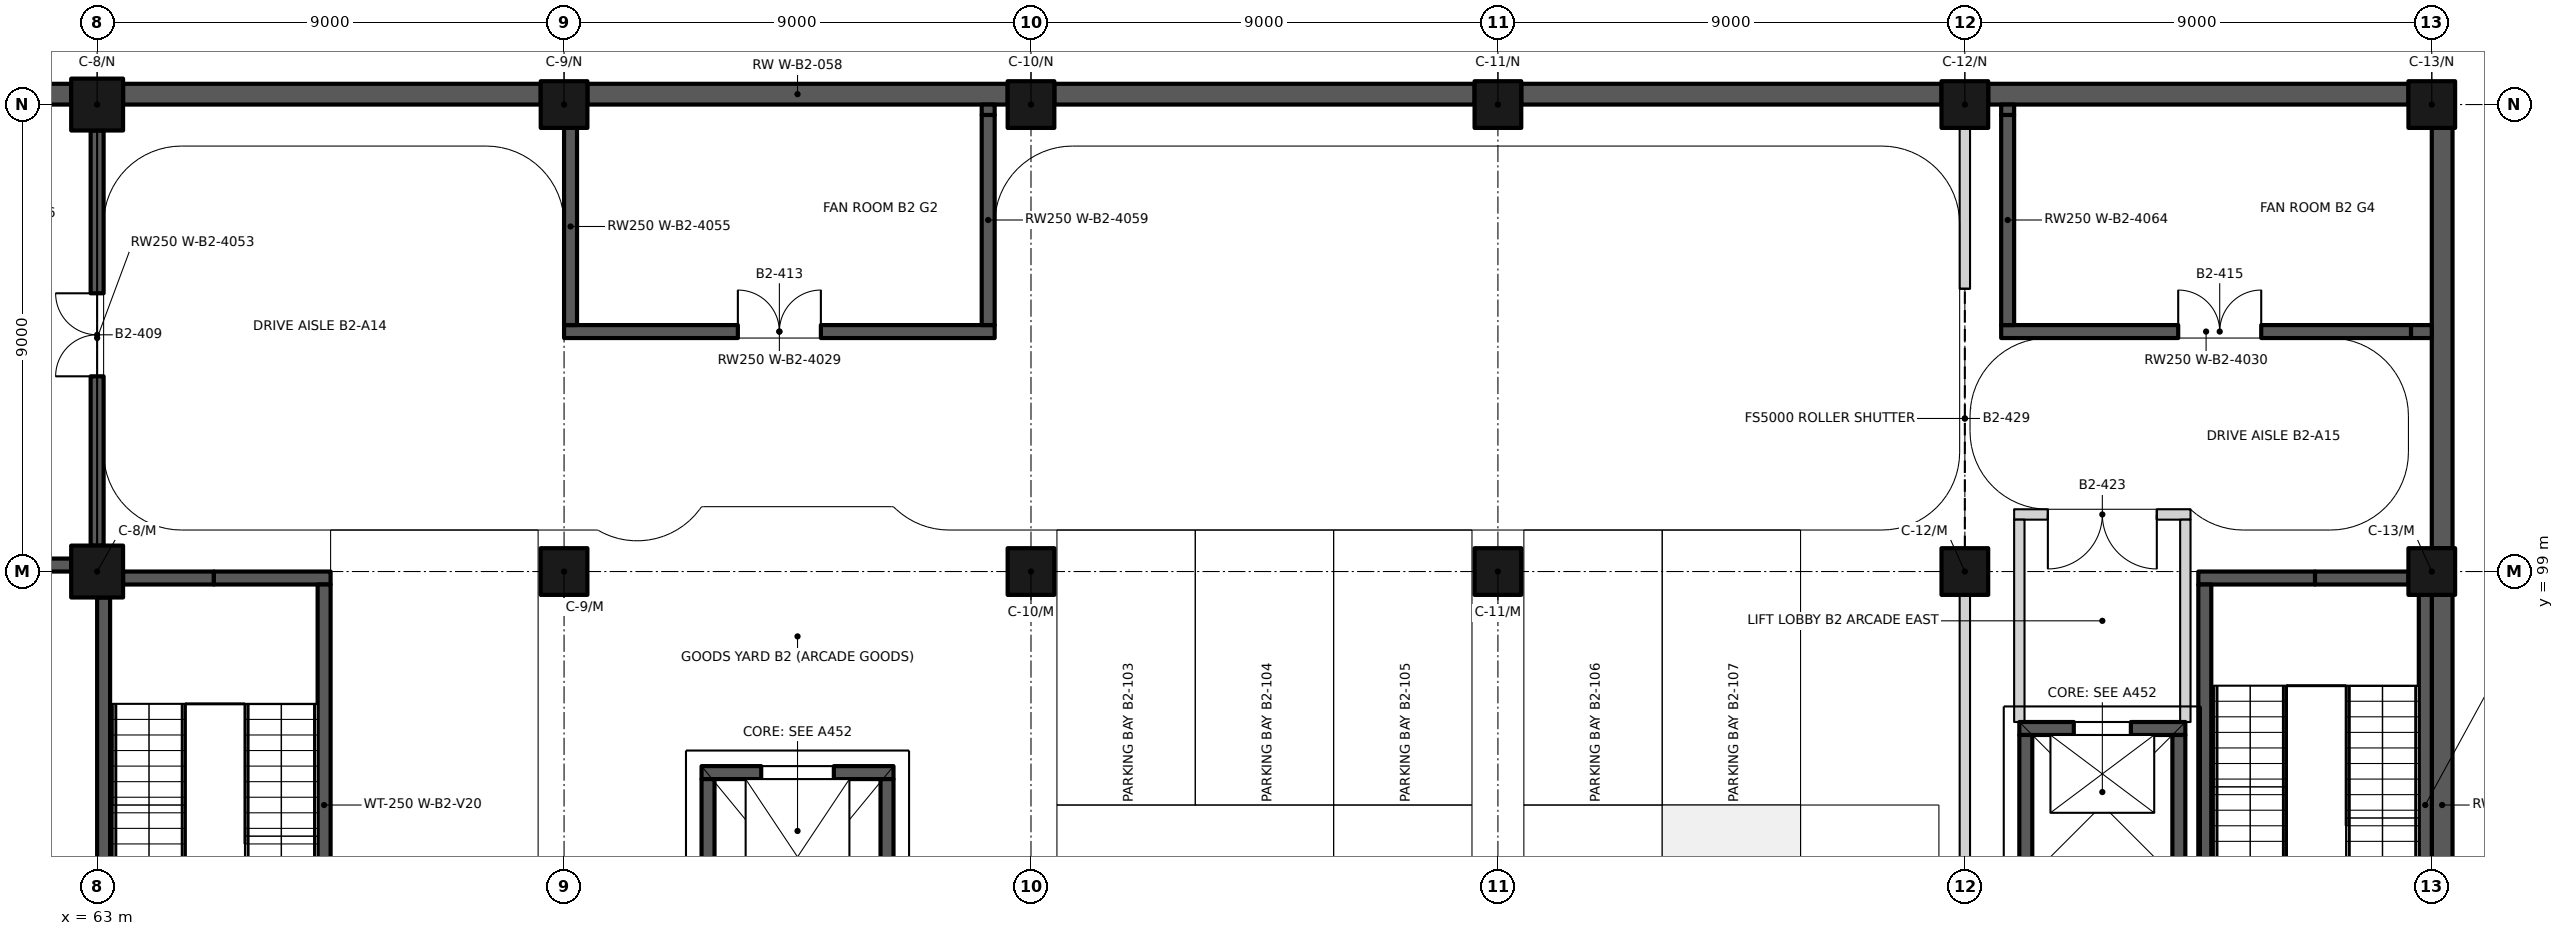
"""IFC4 building model, lengths in metres.
Left out: names, types, materials, properties, quantities, classifications, styles, units other than length and angle.
Written with IfcOpenShell. Run it as: python <this file> out.ifc"""

import sys

from ifc_helpers import new_model, si_unit, direction, frame, frame_2d, origin, origin_2d, place, context, subcontext, project, spatial, rectangle, extrude, element, fill, save


model = new_model("IFC4")
c1 = context("Model", 3, precision=1e-05, world=origin(), true_north=direction((0.0, 1.0)))
c2 = subcontext(c1, "Body", "Model", "MODEL_VIEW")
j1 = project(units=[si_unit("LENGTHUNIT", "METRE"), si_unit("PLANEANGLEUNIT", "RADIAN")], contexts=[c1])
p1 = place(None, origin())
s1 = spatial("IfcSite", under=j1, at=p1, CompositionType="ELEMENT")
p2 = place(p1, origin())
s2 = spatial("IfcBuilding", under=s1, at=p2, CompositionType="ELEMENT")
p3 = place(p2, frame((0.0, 0.0, -9.9)))
s3 = spatial("IfcBuildingStorey", under=s2, at=p3, CompositionType="ELEMENT", Elevation=-9.9)
for number, where, z_axis, x_axis in (
    (1, (108.2, 90.45, -0.5), (0.0, 0.0, 1.0), (0.0, 1.0, 0.0)),
    (2, (108.2, 99.45, -0.5), (0.0, 0.0, 1.0), (0.0, 1.0, 0.0)),
):
    element("IfcWall", number, at=place(p3, frame(where, z_axis=z_axis, x_axis=x_axis)), inside=s3, PredefinedType="SOLIDWALL", context=c2, shape_type="SweptSolid", body=[
        extrude(rectangle(XDim=8.1, YDim=0.4, at=frame_2d((4.05, 0.0))), origin(), (0.0, 0.0, 1.0), 5.3),
    ])
p4 = place(p3, frame((54.5, 108.2, -0.5), z_axis=(0.0, 0.0, 1.0), x_axis=(1.0, 0.0, 0.0)))
e3 = element("IfcWall", 3, at=p4, inside=s3, PredefinedType="SOLIDWALL", context=c2, shape_type="SweptSolid", body=[
    extrude(rectangle(XDim=8.0, YDim=0.4, at=frame_2d((4.0, 0.0))), origin(), (0.0, 0.0, 1.0), 5.3),
])
p5 = place(p3, frame((63.5, 108.2, -0.5), z_axis=(0.0, 0.0, 1.0), x_axis=(1.0, 0.0, 0.0)))
e4 = element("IfcWall", 4, at=p5, inside=s3, PredefinedType="SOLIDWALL", context=c2, shape_type="SweptSolid", body=[
    extrude(rectangle(XDim=8.05, YDim=0.4, at=frame_2d((4.025, 0.0))), origin(), (0.0, 0.0, 1.0), 5.3),
])
for number, where, z_axis, x_axis in (
    (5, (72.45, 108.2, -0.5), (0.0, 0.0, 1.0), (1.0, 0.0, 0.0)),
    (6, (81.45, 108.2, -0.5), (0.0, 0.0, 1.0), (1.0, 0.0, 0.0)),
    (7, (90.45, 108.2, -0.5), (0.0, 0.0, 1.0), (1.0, 0.0, 0.0)),
    (8, (99.45, 108.2, -0.5), (0.0, 0.0, 1.0), (1.0, 0.0, 0.0)),
):
    element("IfcWall", number, at=place(p3, frame(where, z_axis=z_axis, x_axis=x_axis)), inside=s3, PredefinedType="SOLIDWALL", context=c2, shape_type="SweptSolid", body=[
        extrude(rectangle(XDim=8.1, YDim=0.4, at=frame_2d((4.05, 0.0))), origin(), (0.0, 0.0, 1.0), 5.3),
    ])
p6 = place(p3, frame((63.0, 99.0, 0.0), z_axis=(0.0, 0.0, 1.0), x_axis=(1.0, 0.0, 0.0)))
e9 = element("IfcColumn", 9, at=p6, inside=s3, PredefinedType="COLUMN", context=c2, shape_type="SweptSolid", body=[
    extrude(rectangle(XDim=1.0, YDim=1.0, at=origin_2d()), origin(), (0.0, 0.0, 1.0), 4.8),
])
for number, where, z_axis, x_axis in (
    (10, (72.0, 99.0, 0.0), (0.0, 0.0, 1.0), (1.0, 0.0, 0.0)),
    (11, (81.0, 99.0, 0.0), (0.0, 0.0, 1.0), (1.0, 0.0, 0.0)),
    (12, (90.0, 99.0, 0.0), (0.0, 0.0, 1.0), (1.0, 0.0, 0.0)),
    (13, (99.0, 99.0, 0.0), (0.0, 0.0, 1.0), (1.0, 0.0, 0.0)),
    (14, (108.0, 99.0, 0.0), (0.0, 0.0, 1.0), (1.0, 0.0, 0.0)),
):
    element("IfcColumn", number, at=place(p3, frame(where, z_axis=z_axis, x_axis=x_axis)), inside=s3, PredefinedType="COLUMN", context=c2, shape_type="SweptSolid", body=[
        extrude(rectangle(XDim=0.9, YDim=0.9, at=origin_2d()), origin(), (0.0, 0.0, 1.0), 4.8),
    ])
p7 = place(p3, frame((63.0, 108.0, 0.0), z_axis=(0.0, 0.0, 1.0), x_axis=(1.0, 0.0, 0.0)))
e15 = element("IfcColumn", 15, at=p7, inside=s3, PredefinedType="COLUMN", context=c2, shape_type="SweptSolid", body=[
    extrude(rectangle(XDim=1.0, YDim=1.0, at=origin_2d()), origin(), (0.0, 0.0, 1.0), 4.8),
])
for number, where, z_axis, x_axis in (
    (16, (72.0, 108.0, 0.0), (0.0, 0.0, 1.0), (1.0, 0.0, 0.0)),
    (17, (81.0, 108.0, 0.0), (0.0, 0.0, 1.0), (1.0, 0.0, 0.0)),
    (18, (90.0, 108.0, 0.0), (0.0, 0.0, 1.0), (1.0, 0.0, 0.0)),
    (19, (99.0, 108.0, 0.0), (0.0, 0.0, 1.0), (1.0, 0.0, 0.0)),
    (20, (108.0, 108.0, 0.0), (0.0, 0.0, 1.0), (1.0, 0.0, 0.0)),
):
    element("IfcColumn", number, at=place(p3, frame(where, z_axis=z_axis, x_axis=x_axis)), inside=s3, PredefinedType="COLUMN", context=c2, shape_type="SweptSolid", body=[
        extrude(rectangle(XDim=0.9, YDim=0.9, at=origin_2d()), origin(), (0.0, 0.0, 1.0), 4.8),
    ])
p8 = place(p3, frame((103.5, 98.875, 0.0), z_axis=(0.0, 0.0, 1.0), x_axis=(1.0, 0.0, 0.0)))
e21 = element("IfcWall", 21, at=p8, inside=s3, PredefinedType="SHEAR", context=c2, shape_type="SweptSolid", body=[
    extrude(rectangle(XDim=2.25, YDim=0.25, at=frame_2d((1.125, 0.0))), origin(), (0.0, 0.0, 1.0), 4.8),
])
p9 = place(p3, frame((105.75, 98.875, 0.0), z_axis=(0.0, 0.0, 1.0), x_axis=(1.0, 0.0, 0.0)))
e22 = element("IfcWall", 22, at=p9, inside=s3, PredefinedType="SHEAR", context=c2, shape_type="SweptSolid", body=[
    extrude(rectangle(XDim=1.8, YDim=0.25, at=frame_2d((0.9, 0.0))), origin(), (0.0, 0.0, 1.0), 4.8),
])
p10 = place(p3, frame((103.625, 90.25, 0.0), z_axis=(0.0, 0.0, 1.0), x_axis=(0.0, 1.0, 0.0)))
e23 = element("IfcWall", 23, at=p10, inside=s3, PredefinedType="SHEAR", context=c2, shape_type="SweptSolid", body=[
    extrude(rectangle(XDim=8.5, YDim=0.25, at=frame_2d((4.25, 0.0))), origin(), (0.0, 0.0, 1.0), 4.8),
])
p11 = place(p3, frame((107.875, 90.45, 0.0), z_axis=(0.0, 0.0, 1.0), x_axis=(0.0, 1.0, 0.0)))
e24 = element("IfcWall", 24, at=p11, inside=s3, PredefinedType="SHEAR", context=c2, shape_type="SweptSolid", body=[
    extrude(rectangle(XDim=8.1, YDim=0.25, at=frame_2d((4.05, 0.0))), origin(), (0.0, 0.0, 1.0), 4.8),
])
p12 = place(p3, frame((63.5, 98.875, 0.0), z_axis=(0.0, 0.0, 1.0), x_axis=(1.0, 0.0, 0.0)))
e25 = element("IfcWall", 25, at=p12, inside=s3, PredefinedType="SHEAR", context=c2, shape_type="SweptSolid", body=[
    extrude(rectangle(XDim=1.75, YDim=0.25, at=frame_2d((0.875, 0.0))), origin(), (0.0, 0.0, 1.0), 4.8),
])
p13 = place(p3, frame((65.25, 98.875, 0.0), z_axis=(0.0, 0.0, 1.0), x_axis=(1.0, 0.0, 0.0)))
e26 = element("IfcWall", 26, at=p13, inside=s3, PredefinedType="SHEAR", context=c2, shape_type="SweptSolid", body=[
    extrude(rectangle(XDim=2.25, YDim=0.25, at=frame_2d((1.125, 0.0))), origin(), (0.0, 0.0, 1.0), 4.8),
])
p14 = place(p3, frame((63.125, 90.5, 0.0), z_axis=(0.0, 0.0, 1.0), x_axis=(0.0, 1.0, 0.0)))
e27 = element("IfcWall", 27, at=p14, inside=s3, PredefinedType="SHEAR", context=c2, shape_type="SweptSolid", body=[
    extrude(rectangle(XDim=8.0, YDim=0.25, at=frame_2d((4.0, 0.0))), origin(), (0.0, 0.0, 1.0), 4.8),
])
p15 = place(p3, frame((67.375, 90.25, 0.0), z_axis=(0.0, 0.0, 1.0), x_axis=(0.0, 1.0, 0.0)))
e28 = element("IfcWall", 28, at=p15, inside=s3, PredefinedType="SHEAR", context=c2, shape_type="SweptSolid", body=[
    extrude(rectangle(XDim=8.5, YDim=0.25, at=frame_2d((4.25, 0.0))), origin(), (0.0, 0.0, 1.0), 4.8),
])
p16 = place(p3, frame((74.65, 95.125, -1.6), z_axis=(0.0, 0.0, 1.0), x_axis=(1.0, 0.0, 0.0)))
e29 = element("IfcWall", 29, at=p16, inside=s3, PredefinedType="SHEAR", context=c2, shape_type="SweptSolid", body=[
    extrude(rectangle(XDim=3.7, YDim=0.25, at=frame_2d((1.85, 0.0))), origin(), (0.0, 0.0, 1.0), 6.4),
])
p17 = place(p16, frame((1.15, 0.0, 1.6)))
e30 = element("IfcOpeningElement", 30, at=p17, cuts=e29, PredefinedType="OPENING", context=c2, shape_type="SweptSolid", body=[
    extrude(rectangle(XDim=1.4, YDim=2.1, at=frame_2d((0.7, 1.05))), frame((0.0, 0.135, 0.0), z_axis=(0.0, -1.0, 0.0), x_axis=(1.0, 0.0, 0.0)), (0.0, 0.0, 1.0), 0.27),
])
for number, where, z_axis, x_axis in (
    (31, (74.775, 91.0, -1.6), (0.0, 0.0, 1.0), (0.0, 1.0, 0.0)),
    (32, (78.225, 91.0, -1.6), (0.0, 0.0, 1.0), (0.0, 1.0, 0.0)),
):
    element("IfcWall", number, at=place(p3, frame(where, z_axis=z_axis, x_axis=x_axis)), inside=s3, PredefinedType="SHEAR", context=c2, shape_type="SweptSolid", body=[
        extrude(rectangle(XDim=4.0, YDim=0.25, at=frame_2d((2.0, 0.0))), origin(), (0.0, 0.0, 1.0), 6.4),
    ])
p18 = place(p3, frame((100.05, 95.975, -1.6), z_axis=(0.0, 0.0, 1.0), x_axis=(1.0, 0.0, 0.0)))
e33 = element("IfcWall", 33, at=p18, inside=s3, PredefinedType="SHEAR", context=c2, shape_type="SweptSolid", body=[
    extrude(rectangle(XDim=3.2, YDim=0.25, at=frame_2d((1.6, 0.0))), origin(), (0.0, 0.0, 1.0), 6.4),
])
p19 = place(p18, frame((1.05, 0.0, 1.6)))
e34 = element("IfcOpeningElement", 34, at=p19, cuts=e33, PredefinedType="OPENING", context=c2, shape_type="SweptSolid", body=[
    extrude(rectangle(XDim=1.1, YDim=2.1, at=frame_2d((0.55, 1.05))), frame((0.0, 0.135, 0.0), z_axis=(0.0, -1.0, 0.0), x_axis=(1.0, 0.0, 0.0)), (0.0, 0.0, 1.0), 0.27),
])
for number, where, z_axis, x_axis in (
    (35, (100.175, 93.15, -1.6), (0.0, 0.0, 1.0), (0.0, 1.0, 0.0)),
    (36, (103.125, 93.15, -1.6), (0.0, 0.0, 1.0), (0.0, 1.0, 0.0)),
):
    element("IfcWall", number, at=place(p3, frame(where, z_axis=z_axis, x_axis=x_axis)), inside=s3, PredefinedType="SHEAR", context=c2, shape_type="SweptSolid", body=[
        extrude(rectangle(XDim=2.7, YDim=0.25, at=frame_2d((1.35, 0.0))), origin(), (0.0, 0.0, 1.0), 6.4),
    ])
p20 = place(p3, frame((58.5, 99.125, 0.0), z_axis=(0.0, 0.0, 1.0), x_axis=(1.0, 0.0, 0.0)))
e37 = element("IfcWall", 37, at=p20, inside=s3, PredefinedType="SOLIDWALL", context=c2, shape_type="SweptSolid", body=[
    extrude(rectangle(XDim=4.0, YDim=0.25, at=frame_2d((2.0, 0.0))), origin(), (0.0, 0.0, 1.0), 4.0),
])
p21 = place(p3, frame((99.95, 100.1, 0.0), z_axis=(0.0, 0.0, 1.0), x_axis=(1.0, 0.0, 0.0)))
e38 = element("IfcWall", 38, at=p21, inside=s3, PredefinedType="PARTITIONING", context=c2, shape_type="SweptSolid", body=[
    extrude(rectangle(XDim=3.4, YDim=0.2, at=frame_2d((1.7, 0.0))), origin(), (0.0, 0.0, 1.0), 4.5),
])
p22 = place(p21, frame((2.75, 0.0, 0.0), z_axis=(0.0, 0.0, 1.0), x_axis=(-1.0, 0.0, 0.0)))
e39 = element("IfcOpeningElement", 39, at=p22, cuts=e38, PredefinedType="OPENING", context=c2, shape_type="SweptSolid", body=[
    extrude(rectangle(XDim=2.1, YDim=2.4, at=frame_2d((1.05, 1.2))), frame((0.0, 0.11, 0.0), z_axis=(0.0, -1.0, 0.0), x_axis=(1.0, 0.0, 0.0)), (0.0, 0.0, 1.0), 0.22),
])
p23 = place(p3, frame((72.0, 103.625, 0.0), z_axis=(0.0, 0.0, 1.0), x_axis=(1.0, 0.0, 0.0)))
e40 = element("IfcWall", 40, at=p23, inside=s3, PredefinedType="SOLIDWALL", context=c2, shape_type="SweptSolid", body=[
    extrude(rectangle(XDim=8.3, YDim=0.25, at=frame_2d((4.15, 0.0))), origin(), (0.0, 0.0, 1.0), 4.5),
])
p24 = place(p23, frame((3.35, 0.0, 0.0)))
e41 = element("IfcOpeningElement", 41, at=p24, cuts=e40, PredefinedType="OPENING", context=c2, shape_type="SweptSolid", body=[
    extrude(rectangle(XDim=1.6, YDim=2.1, at=frame_2d((0.8, 1.05))), frame((0.0, 0.135, 0.0), z_axis=(0.0, -1.0, 0.0), x_axis=(1.0, 0.0, 0.0)), (0.0, 0.0, 1.0), 0.27),
])
p25 = place(p3, frame((99.7, 103.625, 0.0), z_axis=(0.0, 0.0, 1.0), x_axis=(1.0, 0.0, 0.0)))
e42 = element("IfcWall", 42, at=p25, inside=s3, PredefinedType="SOLIDWALL", context=c2, shape_type="SweptSolid", body=[
    extrude(rectangle(XDim=7.9, YDim=0.25, at=frame_2d((3.95, 0.0))), origin(), (0.0, 0.0, 1.0), 4.5),
])
p26 = place(p25, frame((3.413, 0.0, 0.0)))
e43 = element("IfcOpeningElement", 43, at=p26, cuts=e42, PredefinedType="OPENING", context=c2, shape_type="SweptSolid", body=[
    extrude(rectangle(XDim=1.6, YDim=2.1, at=frame_2d((0.8, 1.05))), frame((0.0, 0.135, 0.0), z_axis=(0.0, -1.0, 0.0), x_axis=(1.0, 0.0, 0.0)), (0.0, 0.0, 1.0), 0.27),
])
p27 = place(p3, frame((107.6, 103.625, 0.0), z_axis=(0.0, 0.0, 1.0), x_axis=(1.0, 0.0, 0.0)))
e44 = element("IfcWall", 44, at=p27, inside=s3, PredefinedType="SOLIDWALL", context=c2, shape_type="SweptSolid", body=[
    extrude(rectangle(XDim=0.4, YDim=0.25, at=frame_2d((0.2, 0.0))), origin(), (0.0, 0.0, 1.0), 4.0),
])
p28 = place(p3, frame((63.0, 99.5, 0.0), z_axis=(0.0, 0.0, 1.0), x_axis=(0.0, 1.0, 0.0)))
e45 = element("IfcWall", 45, at=p28, inside=s3, PredefinedType="SOLIDWALL", context=c2, shape_type="SweptSolid", body=[
    extrude(rectangle(XDim=8.0, YDim=0.25, at=frame_2d((4.0, 0.0))), origin(), (0.0, 0.0, 1.0), 4.0),
])
p29 = place(p28, frame((3.262, 0.0, 0.0)))
e46 = element("IfcOpeningElement", 46, at=p29, cuts=e45, PredefinedType="OPENING", context=c2, shape_type="SweptSolid", body=[
    extrude(rectangle(XDim=1.6, YDim=2.1, at=frame_2d((0.8, 1.05))), frame((0.0, 0.135, 0.0), z_axis=(0.0, -1.0, 0.0), x_axis=(1.0, 0.0, 0.0)), (0.0, 0.0, 1.0), 0.27),
])
p30 = place(p3, frame((72.125, 103.75, 0.0), z_axis=(0.0, 0.0, 1.0), x_axis=(0.0, 1.0, 0.0)))
e47 = element("IfcWall", 47, at=p30, inside=s3, PredefinedType="SOLIDWALL", context=c2, shape_type="SweptSolid", body=[
    extrude(rectangle(XDim=3.8, YDim=0.25, at=frame_2d((1.9, 0.0))), origin(), (0.0, 0.0, 1.0), 4.5),
])
p31 = place(p3, frame((80.175, 103.75, 0.0), z_axis=(0.0, 0.0, 1.0), x_axis=(0.0, 1.0, 0.0)))
e48 = element("IfcWall", 48, at=p31, inside=s3, PredefinedType="SOLIDWALL", context=c2, shape_type="SweptSolid", body=[
    extrude(rectangle(XDim=4.05, YDim=0.25, at=frame_2d((2.025, 0.0))), origin(), (0.0, 0.0, 1.0), 4.5),
])
p32 = place(p3, frame((80.175, 107.8, 0.0), z_axis=(0.0, 0.0, 1.0), x_axis=(0.0, 1.0, 0.0)))
e49 = element("IfcWall", 49, at=p32, inside=s3, PredefinedType="SOLIDWALL", context=c2, shape_type="SweptSolid", body=[
    extrude(rectangle(XDim=0.2, YDim=0.25, at=frame_2d((0.1, 0.0))), origin(), (0.0, 0.0, 1.0), 4.0),
])
p33 = place(p3, frame((99.0, 90.45, 0.0), z_axis=(0.0, 0.0, 1.0), x_axis=(0.0, 1.0, 0.0)))
e50 = element("IfcWall", 50, at=p33, inside=s3, PredefinedType="PARTITIONING", context=c2, shape_type="SweptSolid", body=[
    extrude(rectangle(XDim=8.1, YDim=0.2, at=frame_2d((4.05, 0.0))), origin(), (0.0, 0.0, 1.0), 4.0),
])
p34 = place(p3, frame((99.0, 99.45, 0.0), z_axis=(0.0, 0.0, 1.0), x_axis=(0.0, 1.0, 0.0)))
e51 = element("IfcWall", 51, at=p34, inside=s3, PredefinedType="PARTITIONING", context=c2, shape_type="SweptSolid", body=[
    extrude(rectangle(XDim=8.1, YDim=0.2, at=frame_2d((4.05, 0.0))), origin(), (0.0, 0.0, 1.0), 4.0),
])
p35 = place(p34, origin())
e52 = element("IfcOpeningElement", 52, at=p35, cuts=e51, PredefinedType="OPENING", context=c2, shape_type="SweptSolid", body=[
    extrude(rectangle(XDim=5.0, YDim=2.4, at=frame_2d((2.5, 1.2))), frame((0.0, 0.11, 0.0), z_axis=(0.0, -1.0, 0.0), x_axis=(1.0, 0.0, 0.0)), (0.0, 0.0, 1.0), 0.22),
])
p36 = place(p3, frame((99.825, 103.75, 0.0), z_axis=(0.0, 0.0, 1.0), x_axis=(0.0, 1.0, 0.0)))
e53 = element("IfcWall", 53, at=p36, inside=s3, PredefinedType="SOLIDWALL", context=c2, shape_type="SweptSolid", body=[
    extrude(rectangle(XDim=4.05, YDim=0.25, at=frame_2d((2.025, 0.0))), origin(), (0.0, 0.0, 1.0), 4.5),
])
p37 = place(p3, frame((99.825, 107.8, 0.0), z_axis=(0.0, 0.0, 1.0), x_axis=(0.0, 1.0, 0.0)))
e54 = element("IfcWall", 54, at=p37, inside=s3, PredefinedType="SOLIDWALL", context=c2, shape_type="SweptSolid", body=[
    extrude(rectangle(XDim=0.2, YDim=0.25, at=frame_2d((0.1, 0.0))), origin(), (0.0, 0.0, 1.0), 4.0),
])
for number, where, z_axis, x_axis in (
    (55, (100.05, 96.1, 0.0), (0.0, 0.0, 1.0), (0.0, 1.0, 0.0)),
    (56, (103.25, 96.1, 0.0), (0.0, 0.0, 1.0), (0.0, 1.0, 0.0)),
):
    element("IfcWall", number, at=place(p3, frame(where, z_axis=z_axis, x_axis=x_axis)), inside=s3, PredefinedType="PARTITIONING", context=c2, shape_type="SweptSolid", body=[
        extrude(rectangle(XDim=3.9, YDim=0.2, at=frame_2d((1.95, 0.0))), origin(), (0.0, 0.0, 1.0), 4.5),
    ])
p38 = place(p17, origin())
e57 = element("IfcDoor", 57, at=p38, inside=s3, OperationType="DOUBLE_DOOR_SLIDING", PredefinedType="DOOR", context=c2, shape_type="SweptSolid", body=[
    extrude(rectangle(XDim=1.4, YDim=2.1, at=frame_2d((0.7, 1.05))), frame((0.0, 0.025, 0.0), z_axis=(0.0, -1.0, 0.0), x_axis=(1.0, 0.0, 0.0)), (0.0, 0.0, 1.0), 0.05),
])
fill(e30, e57)
p39 = place(p19, origin())
e58 = element("IfcDoor", 58, at=p39, inside=s3, OperationType="DOUBLE_DOOR_SLIDING", PredefinedType="DOOR", context=c2, shape_type="SweptSolid", body=[
    extrude(rectangle(XDim=1.1, YDim=2.1, at=frame_2d((0.55, 1.05))), frame((0.0, 0.025, 0.0), z_axis=(0.0, -1.0, 0.0), x_axis=(1.0, 0.0, 0.0)), (0.0, 0.0, 1.0), 0.05),
])
fill(e34, e58)
p40 = place(p29, origin())
e59 = element("IfcDoor", 59, at=p40, inside=s3, OperationType="DOUBLE_DOOR_SINGLE_SWING", PredefinedType="DOOR", context=c2, shape_type="SweptSolid", body=[
    extrude(rectangle(XDim=1.6, YDim=2.1, at=frame_2d((0.8, 1.05))), frame((0.0, 0.025, 0.0), z_axis=(0.0, -1.0, 0.0), x_axis=(1.0, 0.0, 0.0)), (0.0, 0.0, 1.0), 0.05),
])
fill(e46, e59)
p41 = place(p24, origin())
e60 = element("IfcDoor", 60, at=p41, inside=s3, OperationType="DOUBLE_DOOR_SINGLE_SWING", PredefinedType="DOOR", context=c2, shape_type="SweptSolid", body=[
    extrude(rectangle(XDim=1.6, YDim=2.1, at=frame_2d((0.8, 1.05))), frame((0.0, 0.025, 0.0), z_axis=(0.0, -1.0, 0.0), x_axis=(1.0, 0.0, 0.0)), (0.0, 0.0, 1.0), 0.05),
])
fill(e41, e60)
p42 = place(p26, origin())
e61 = element("IfcDoor", 61, at=p42, inside=s3, OperationType="DOUBLE_DOOR_SINGLE_SWING", PredefinedType="DOOR", context=c2, shape_type="SweptSolid", body=[
    extrude(rectangle(XDim=1.6, YDim=2.1, at=frame_2d((0.8, 1.05))), frame((0.0, 0.025, 0.0), z_axis=(0.0, -1.0, 0.0), x_axis=(1.0, 0.0, 0.0)), (0.0, 0.0, 1.0), 0.05),
])
fill(e43, e61)
p43 = place(p22, origin())
e62 = element("IfcDoor", 62, at=p43, inside=s3, OperationType="DOUBLE_DOOR_SINGLE_SWING", PredefinedType="DOOR", context=c2, shape_type="SweptSolid", body=[
    extrude(rectangle(XDim=2.1, YDim=2.4, at=frame_2d((1.05, 1.2))), frame((0.0, 0.025, 0.0), z_axis=(0.0, -1.0, 0.0), x_axis=(1.0, 0.0, 0.0)), (0.0, 0.0, 1.0), 0.05),
])
fill(e39, e62)
p44 = place(p35, origin())
e63 = element("IfcDoor", 63, at=p44, inside=s3, OperationType="SINGLE_SWING_LEFT", PredefinedType="DOOR", context=c2, shape_type="SweptSolid", body=[
    extrude(rectangle(XDim=5.0, YDim=2.4, at=frame_2d((2.5, 1.2))), frame((0.0, 0.025, 0.0), z_axis=(0.0, -1.0, 0.0), x_axis=(1.0, 0.0, 0.0)), (0.0, 0.0, 1.0), 0.05),
])
fill(e52, e63)
save(model, sys.argv[1])
